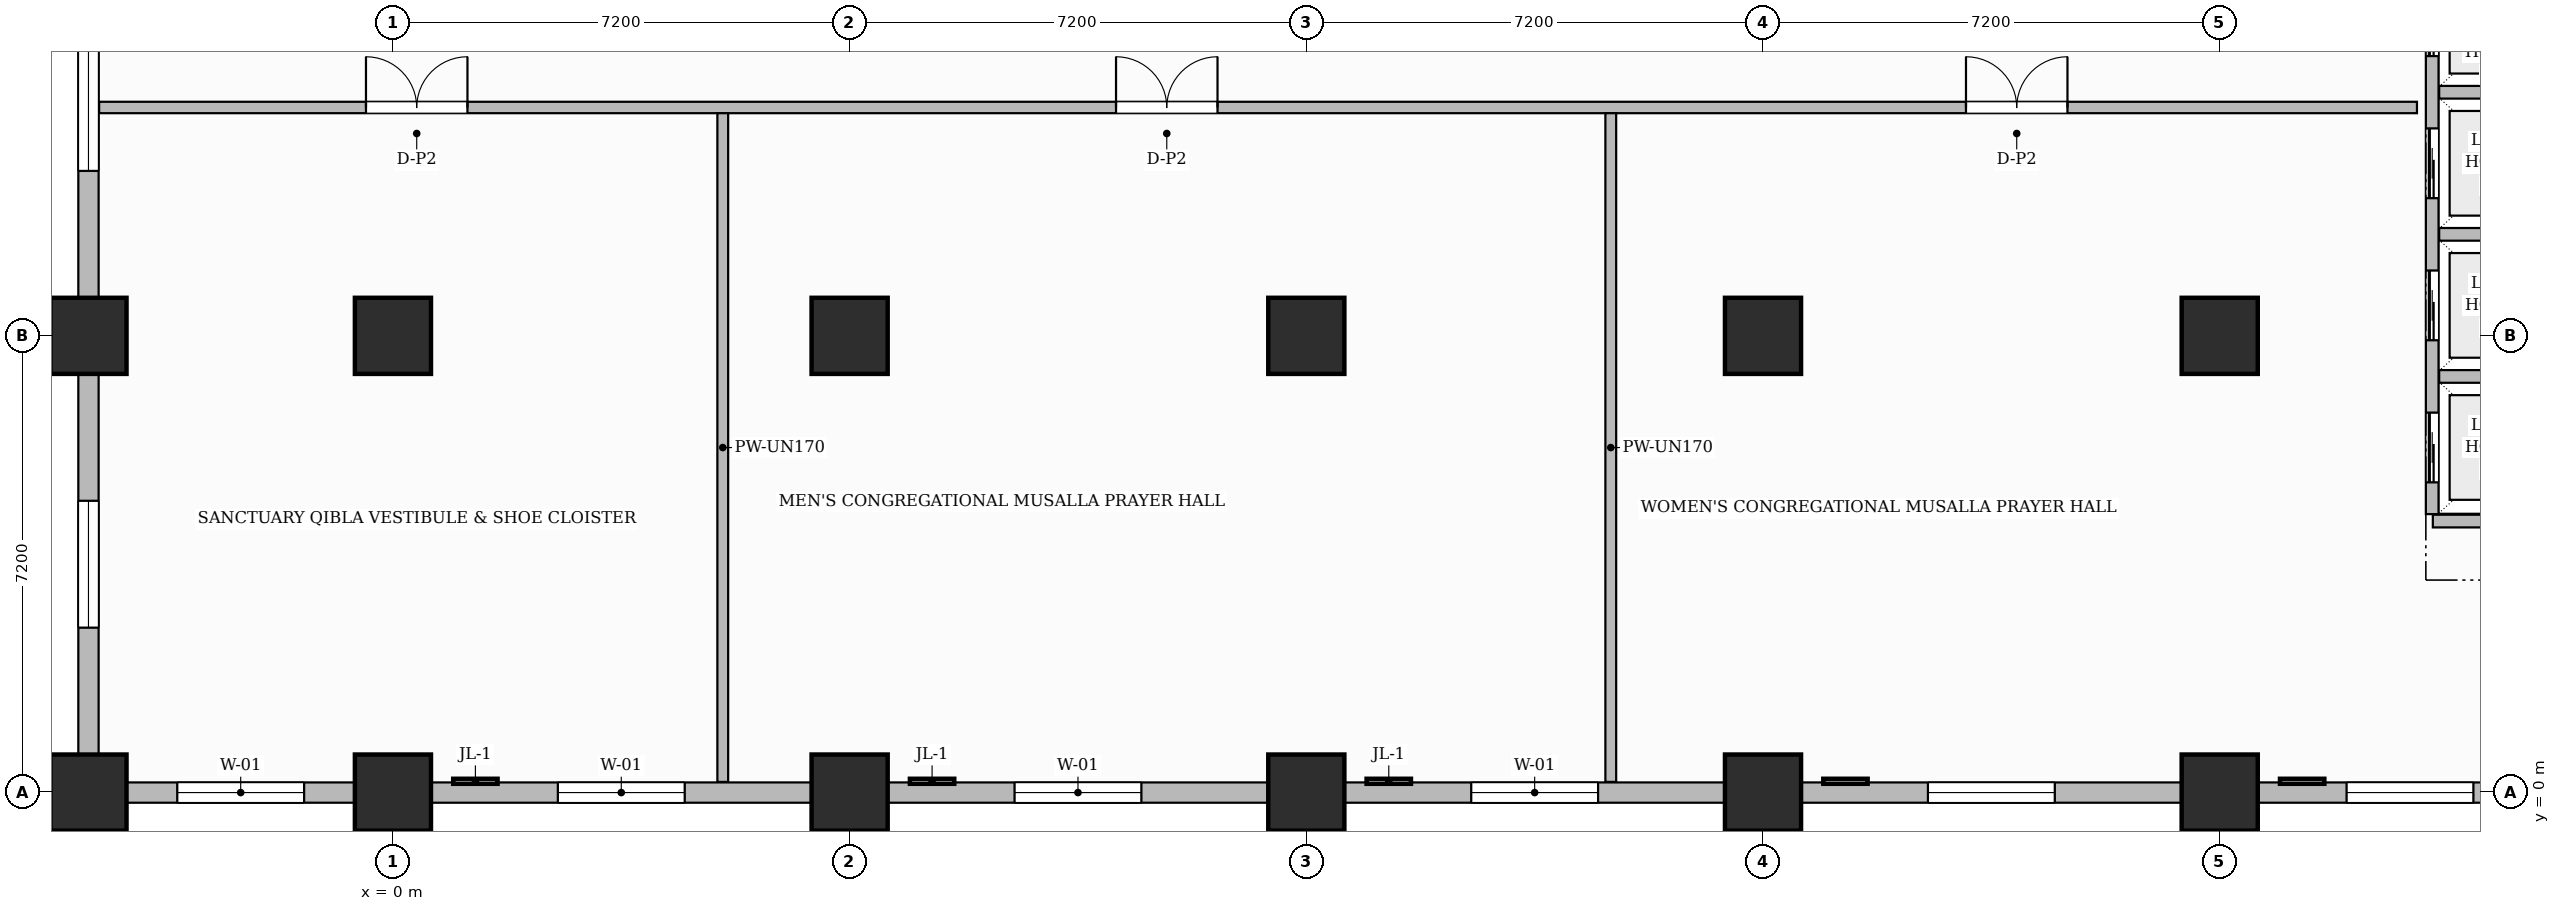
"""IFC4 building model, lengths in metres.
Left out: names, types, materials, properties, quantities, classifications, styles, units other than length and angle.
Written with IfcOpenShell. Run it as: python <this file> out.ifc"""

import sys

from ifc_helpers import new_model, si_unit, direction, frame, frame_2d, origin, origin_2d, place, context, subcontext, project, spatial, rectangle, extrude, source, transform, mapped, element, fill, save


model = new_model("IFC4")
c1 = context("Model", 3, precision=1e-05, world=origin(), true_north=direction((0.0, 1.0)))
c2 = subcontext(c1, "Body", "Model", "MODEL_VIEW")
j1 = project(units=[si_unit("LENGTHUNIT", "METRE"), si_unit("PLANEANGLEUNIT", "RADIAN")], contexts=[c1])
p1 = place(None, origin())
s1 = spatial("IfcSite", under=j1, at=p1, CompositionType="ELEMENT")
p2 = place(p1, origin())
s2 = spatial("IfcBuilding", under=s1, at=p2, CompositionType="ELEMENT")
p3 = place(p2, frame((0.0, 0.0, 21.6)))
s3 = spatial("IfcBuildingStorey", under=s2, at=p3, CompositionType="ELEMENT", Elevation=21.6)
m1 = source(origin(), c2, "Body", "SweptSolid", [
    extrude(rectangle(XDim=1.2, YDim=1.2, at=origin_2d()), origin(), (0.0, 0.0, 1.0), 5.4),
])
for number, where, z_axis, x_axis in (
    (1, (-4.8, 0.0, 0.0), (0.0, 0.0, 1.0), (1.0, 0.0, 0.0)),
    (2, (-4.8, 7.2, 0.0), (0.0, 0.0, 1.0), (1.0, 0.0, 0.0)),
    (3, (0.0, 0.0, 0.0), (0.0, 0.0, 1.0), (1.0, 0.0, 0.0)),
    (4, (0.0, 7.2, 0.0), (0.0, 0.0, 1.0), (1.0, 0.0, 0.0)),
    (5, (7.2, 0.0, 0.0), (0.0, 0.0, 1.0), (1.0, 0.0, 0.0)),
    (6, (7.2, 7.2, 0.0), (0.0, 0.0, 1.0), (1.0, 0.0, 0.0)),
    (7, (14.4, 0.0, 0.0), (0.0, 0.0, 1.0), (1.0, 0.0, 0.0)),
    (8, (14.4, 7.2, 0.0), (0.0, 0.0, 1.0), (1.0, 0.0, 0.0)),
    (9, (21.6, 0.0, 0.0), (0.0, 0.0, 1.0), (1.0, 0.0, 0.0)),
    (10, (21.6, 7.2, 0.0), (0.0, 0.0, 1.0), (1.0, 0.0, 0.0)),
    (11, (28.8, 0.0, 0.0), (0.0, 0.0, 1.0), (1.0, 0.0, 0.0)),
    (12, (28.8, 7.2, 0.0), (0.0, 0.0, 1.0), (1.0, 0.0, 0.0)),
):
    element("IfcColumn", number, at=place(p3, frame(where, z_axis=z_axis, x_axis=x_axis)), inside=s3, PredefinedType="COLUMN", context=c2, shape_type="MappedRepresentation", body=[
        mapped(m1, transform((0.0, 0.0, 0.0), scale=1.0)),
    ])
p4 = place(p3, frame((32.16, 4.28, 0.0), z_axis=(0.0, 0.0, 1.0), x_axis=(1.0, 0.0, 0.0)))
e13 = element("IfcWall", 13, at=p4, inside=s3, PredefinedType="PARTITIONING", context=c2, shape_type="SweptSolid", body=[
    extrude(rectangle(XDim=2.31, YDim=0.2, at=frame_2d((1.155, 0.0))), origin(), (0.0, 0.0, 1.0), 5.1),
])
p5 = place(p3, frame((32.15, 4.39, 0.0), z_axis=(0.0, 0.0, 1.0), x_axis=(0.0, 1.0, 0.0)))
e14 = element("IfcWall", 14, at=p5, inside=s3, PredefinedType="PARTITIONING", context=c2, shape_type="SweptSolid", body=[
    extrude(rectangle(XDim=8.82, YDim=0.2, at=frame_2d((4.41, 0.0))), origin(), (0.0, 0.0, 1.0), 5.1),
])
p6 = place(p5, frame((0.5, 0.0, 0.0)))
e15 = element("IfcOpeningElement", 15, at=p6, cuts=e14, PredefinedType="OPENING", context=c2, shape_type="SweptSolid", body=[
    extrude(rectangle(XDim=1.1, YDim=2.2, at=frame_2d((0.55, 1.1))), frame((0.0, 0.11, 0.0), z_axis=(0.0, -1.0, 0.0), x_axis=(1.0, 0.0, 0.0)), (0.0, 0.0, 1.0), 0.22),
])
p7 = place(p5, frame((2.74, 0.0, 0.0)))
e16 = element("IfcOpeningElement", 16, at=p7, cuts=e14, PredefinedType="OPENING", context=c2, shape_type="SweptSolid", body=[
    extrude(rectangle(XDim=1.1, YDim=2.2, at=frame_2d((0.55, 1.1))), frame((0.0, 0.11, 0.0), z_axis=(0.0, -1.0, 0.0), x_axis=(1.0, 0.0, 0.0)), (0.0, 0.0, 1.0), 0.22),
])
p8 = place(p5, frame((4.98, 0.0, 0.0)))
e17 = element("IfcOpeningElement", 17, at=p8, cuts=e14, PredefinedType="OPENING", context=c2, shape_type="SweptSolid", body=[
    extrude(rectangle(XDim=1.1, YDim=2.2, at=frame_2d((0.55, 1.1))), frame((0.0, 0.11, 0.0), z_axis=(0.0, -1.0, 0.0), x_axis=(1.0, 0.0, 0.0)), (0.0, 0.0, 1.0), 0.22),
])
p9 = place(p5, frame((7.22, 0.0, 0.0)))
e18 = element("IfcOpeningElement", 18, at=p9, cuts=e14, PredefinedType="OPENING", context=c2, shape_type="SweptSolid", body=[
    extrude(rectangle(XDim=1.1, YDim=2.2, at=frame_2d((0.55, 1.1))), frame((0.0, 0.11, 0.0), z_axis=(0.0, -1.0, 0.0), x_axis=(1.0, 0.0, 0.0)), (0.0, 0.0, 1.0), 0.22),
])
for number, where, z_axis, x_axis in (
    (19, (32.26, 6.56, 0.0), (0.0, 0.0, 1.0), (1.0, 0.0, 0.0)),
    (20, (32.26, 8.8, 0.0), (0.0, 0.0, 1.0), (1.0, 0.0, 0.0)),
    (21, (32.26, 11.04, 0.0), (0.0, 0.0, 1.0), (1.0, 0.0, 0.0)),
):
    element("IfcWall", number, at=place(p3, frame(where, z_axis=z_axis, x_axis=x_axis)), inside=s3, PredefinedType="PARTITIONING", context=c2, shape_type="SweptSolid", body=[
        extrude(rectangle(XDim=2.18, YDim=0.2, at=frame_2d((1.09, 0.0))), origin(), (0.0, 0.0, 1.0), 5.1),
    ])
p10 = place(p3, frame((-4.632, 10.8, 0.0), z_axis=(0.0, 0.0, 1.0), x_axis=(1.0, 0.0, 0.0)))
e22 = element("IfcWall", 22, at=p10, inside=s3, PredefinedType="PARTITIONING", context=c2, shape_type="SweptSolid", body=[
    extrude(rectangle(XDim=36.542, YDim=0.18, at=frame_2d((18.271, 0.0))), origin(), (0.0, 0.0, 1.0), 5.1),
])
p11 = place(p10, frame((4.207, 0.0, 0.0)))
e23 = element("IfcOpeningElement", 23, at=p11, cuts=e22, PredefinedType="OPENING", context=c2, shape_type="SweptSolid", body=[
    extrude(rectangle(XDim=1.6, YDim=2.4, at=frame_2d((0.8, 1.2))), frame((0.0, 0.1, 0.0), z_axis=(0.0, -1.0, 0.0), x_axis=(1.0, 0.0, 0.0)), (0.0, 0.0, 1.0), 0.2),
])
p12 = place(p10, frame((16.032, 0.0, 0.0)))
e24 = element("IfcOpeningElement", 24, at=p12, cuts=e22, PredefinedType="OPENING", context=c2, shape_type="SweptSolid", body=[
    extrude(rectangle(XDim=1.6, YDim=2.4, at=frame_2d((0.8, 1.2))), frame((0.0, 0.1, 0.0), z_axis=(0.0, -1.0, 0.0), x_axis=(1.0, 0.0, 0.0)), (0.0, 0.0, 1.0), 0.2),
])
p13 = place(p10, frame((29.432, 0.0, 0.0)))
e25 = element("IfcOpeningElement", 25, at=p13, cuts=e22, PredefinedType="OPENING", context=c2, shape_type="SweptSolid", body=[
    extrude(rectangle(XDim=1.6, YDim=2.4, at=frame_2d((0.8, 1.2))), frame((0.0, 0.1, 0.0), z_axis=(0.0, -1.0, 0.0), x_axis=(1.0, 0.0, 0.0)), (0.0, 0.0, 1.0), 0.2),
])
for number, where, z_axis, x_axis in (
    (26, (5.2, 0.168, 0.0), (0.0, 0.0, 1.0), (0.0, 1.0, 0.0)),
    (27, (19.2, 0.168, 0.0), (0.0, 0.0, 1.0), (0.0, 1.0, 0.0)),
):
    element("IfcWall", number, at=place(p3, frame(where, z_axis=z_axis, x_axis=x_axis)), inside=s3, PredefinedType="PARTITIONING", context=c2, shape_type="SweptSolid", body=[
        extrude(rectangle(XDim=10.542, YDim=0.17, at=frame_2d((5.271, 0.0))), origin(), (0.0, 0.0, 1.0), 5.1),
    ])
p14 = place(p3, frame((-4.8, 0.0, 0.0), z_axis=(0.0, 0.0, 1.0), x_axis=(1.0, 0.0, 0.0)))
e28 = element("IfcWall", 28, at=p14, inside=s3, PredefinedType="SOLIDWALL", context=c2, shape_type="SweptSolid", body=[
    extrude(rectangle(XDim=85.2, YDim=0.32, at=frame_2d((42.6, 0.0))), origin(), (0.0, 0.0, 1.0), 4.085),
])
p15 = place(p14, frame((1.4, 0.0, 0.75)))
e29 = element("IfcOpeningElement", 29, at=p15, cuts=e28, PredefinedType="OPENING", context=c2, shape_type="SweptSolid", body=[
    extrude(rectangle(XDim=2.0, YDim=2.6, at=frame_2d((1.0, 1.3))), frame((0.0, 0.17, 0.0), z_axis=(0.0, -1.0, 0.0), x_axis=(1.0, 0.0, 0.0)), (0.0, 0.0, 1.0), 0.34),
])
p16 = place(p14, frame((7.4, 0.0, 0.75)))
e30 = element("IfcOpeningElement", 30, at=p16, cuts=e28, PredefinedType="OPENING", context=c2, shape_type="SweptSolid", body=[
    extrude(rectangle(XDim=2.0, YDim=2.6, at=frame_2d((1.0, 1.3))), frame((0.0, 0.17, 0.0), z_axis=(0.0, -1.0, 0.0), x_axis=(1.0, 0.0, 0.0)), (0.0, 0.0, 1.0), 0.34),
])
p17 = place(p14, frame((14.6, 0.0, 0.75)))
e31 = element("IfcOpeningElement", 31, at=p17, cuts=e28, PredefinedType="OPENING", context=c2, shape_type="SweptSolid", body=[
    extrude(rectangle(XDim=2.0, YDim=2.6, at=frame_2d((1.0, 1.3))), frame((0.0, 0.17, 0.0), z_axis=(0.0, -1.0, 0.0), x_axis=(1.0, 0.0, 0.0)), (0.0, 0.0, 1.0), 0.34),
])
p18 = place(p14, frame((21.8, 0.0, 0.75)))
e32 = element("IfcOpeningElement", 32, at=p18, cuts=e28, PredefinedType="OPENING", context=c2, shape_type="SweptSolid", body=[
    extrude(rectangle(XDim=2.0, YDim=2.6, at=frame_2d((1.0, 1.3))), frame((0.0, 0.17, 0.0), z_axis=(0.0, -1.0, 0.0), x_axis=(1.0, 0.0, 0.0)), (0.0, 0.0, 1.0), 0.34),
])
p19 = place(p14, frame((29.0, 0.0, 0.75)))
e33 = element("IfcOpeningElement", 33, at=p19, cuts=e28, PredefinedType="OPENING", context=c2, shape_type="SweptSolid", body=[
    extrude(rectangle(XDim=2.0, YDim=2.6, at=frame_2d((1.0, 1.3))), frame((0.0, 0.17, 0.0), z_axis=(0.0, -1.0, 0.0), x_axis=(1.0, 0.0, 0.0)), (0.0, 0.0, 1.0), 0.34),
])
p20 = place(p14, frame((35.6, 0.0, 0.75)))
e34 = element("IfcOpeningElement", 34, at=p20, cuts=e28, PredefinedType="OPENING", context=c2, shape_type="SweptSolid", body=[
    extrude(rectangle(XDim=2.0, YDim=2.6, at=frame_2d((1.0, 1.3))), frame((0.0, 0.17, 0.0), z_axis=(0.0, -1.0, 0.0), x_axis=(1.0, 0.0, 0.0)), (0.0, 0.0, 1.0), 0.34),
])
p21 = place(p14, frame((42.2, 0.0, 0.75)))
e35 = element("IfcOpeningElement", 35, at=p21, cuts=e28, PredefinedType="OPENING", context=c2, shape_type="SweptSolid", body=[
    extrude(rectangle(XDim=2.0, YDim=2.6, at=frame_2d((1.0, 1.3))), frame((0.0, 0.17, 0.0), z_axis=(0.0, -1.0, 0.0), x_axis=(1.0, 0.0, 0.0)), (0.0, 0.0, 1.0), 0.34),
])
p22 = place(p14, frame((49.7, 0.0, 0.75)))
e36 = element("IfcOpeningElement", 36, at=p22, cuts=e28, PredefinedType="OPENING", context=c2, shape_type="SweptSolid", body=[
    extrude(rectangle(XDim=2.0, YDim=2.6, at=frame_2d((1.0, 1.3))), frame((0.0, 0.17, 0.0), z_axis=(0.0, -1.0, 0.0), x_axis=(1.0, 0.0, 0.0)), (0.0, 0.0, 1.0), 0.34),
])
p23 = place(p14, frame((57.5, 0.0, 0.75)))
e37 = element("IfcOpeningElement", 37, at=p23, cuts=e28, PredefinedType="OPENING", context=c2, shape_type="SweptSolid", body=[
    extrude(rectangle(XDim=2.0, YDim=2.6, at=frame_2d((1.0, 1.3))), frame((0.0, 0.17, 0.0), z_axis=(0.0, -1.0, 0.0), x_axis=(1.0, 0.0, 0.0)), (0.0, 0.0, 1.0), 0.34),
])
p24 = place(p14, frame((66.8, 0.0, 0.75)))
e38 = element("IfcOpeningElement", 38, at=p24, cuts=e28, PredefinedType="OPENING", context=c2, shape_type="SweptSolid", body=[
    extrude(rectangle(XDim=2.0, YDim=2.6, at=frame_2d((1.0, 1.3))), frame((0.0, 0.17, 0.0), z_axis=(0.0, -1.0, 0.0), x_axis=(1.0, 0.0, 0.0)), (0.0, 0.0, 1.0), 0.34),
])
p25 = place(p14, frame((77.6, 0.0, 0.75)))
e39 = element("IfcOpeningElement", 39, at=p25, cuts=e28, PredefinedType="OPENING", context=c2, shape_type="SweptSolid", body=[
    extrude(rectangle(XDim=2.0, YDim=2.6, at=frame_2d((1.0, 1.3))), frame((0.0, 0.17, 0.0), z_axis=(0.0, -1.0, 0.0), x_axis=(1.0, 0.0, 0.0)), (0.0, 0.0, 1.0), 0.34),
])
p26 = place(p3, frame((-4.8, 0.05, 0.0), z_axis=(0.0, 0.0, 1.0), x_axis=(0.0, 1.0, 0.0)))
e40 = element("IfcWall", 40, at=p26, inside=s3, PredefinedType="SOLIDWALL", context=c2, shape_type="SweptSolid", body=[
    extrude(rectangle(XDim=46.7, YDim=0.32, at=frame_2d((23.35, 0.0))), origin(), (0.0, 0.0, 1.0), 5.1),
])
p27 = place(p26, frame((2.55, 0.0, 0.75)))
e41 = element("IfcOpeningElement", 41, at=p27, cuts=e40, PredefinedType="OPENING", context=c2, shape_type="SweptSolid", body=[
    extrude(rectangle(XDim=2.0, YDim=2.6, at=frame_2d((1.0, 1.3))), frame((0.0, 0.17, 0.0), z_axis=(0.0, -1.0, 0.0), x_axis=(1.0, 0.0, 0.0)), (0.0, 0.0, 1.0), 0.34),
])
p28 = place(p26, frame((9.75, 0.0, 0.75)))
e42 = element("IfcOpeningElement", 42, at=p28, cuts=e40, PredefinedType="OPENING", context=c2, shape_type="SweptSolid", body=[
    extrude(rectangle(XDim=2.0, YDim=2.6, at=frame_2d((1.0, 1.3))), frame((0.0, 0.17, 0.0), z_axis=(0.0, -1.0, 0.0), x_axis=(1.0, 0.0, 0.0)), (0.0, 0.0, 1.0), 0.34),
])
p29 = place(p26, frame((16.95, 0.0, 0.75)))
e43 = element("IfcOpeningElement", 43, at=p29, cuts=e40, PredefinedType="OPENING", context=c2, shape_type="SweptSolid", body=[
    extrude(rectangle(XDim=2.0, YDim=2.6, at=frame_2d((1.0, 1.3))), frame((0.0, 0.17, 0.0), z_axis=(0.0, -1.0, 0.0), x_axis=(1.0, 0.0, 0.0)), (0.0, 0.0, 1.0), 0.34),
])
p30 = place(p26, frame((27.75, 0.0, 0.75)))
e44 = element("IfcOpeningElement", 44, at=p30, cuts=e40, PredefinedType="OPENING", context=c2, shape_type="SweptSolid", body=[
    extrude(rectangle(XDim=2.0, YDim=2.6, at=frame_2d((1.0, 1.3))), frame((0.0, 0.17, 0.0), z_axis=(0.0, -1.0, 0.0), x_axis=(1.0, 0.0, 0.0)), (0.0, 0.0, 1.0), 0.34),
])
p31 = place(p26, frame((34.95, 0.0, 0.75)))
e45 = element("IfcOpeningElement", 45, at=p31, cuts=e40, PredefinedType="OPENING", context=c2, shape_type="SweptSolid", body=[
    extrude(rectangle(XDim=2.0, YDim=2.6, at=frame_2d((1.0, 1.3))), frame((0.0, 0.17, 0.0), z_axis=(0.0, -1.0, 0.0), x_axis=(1.0, 0.0, 0.0)), (0.0, 0.0, 1.0), 0.34),
])
p32 = place(p26, frame((42.15, 0.0, 0.75)))
e46 = element("IfcOpeningElement", 46, at=p32, cuts=e40, PredefinedType="OPENING", context=c2, shape_type="SweptSolid", body=[
    extrude(rectangle(XDim=2.0, YDim=2.6, at=frame_2d((1.0, 1.3))), frame((0.0, 0.17, 0.0), z_axis=(0.0, -1.0, 0.0), x_axis=(1.0, 0.0, 0.0)), (0.0, 0.0, 1.0), 0.34),
])
m2 = source(origin(), c2, "Body", "SweptSolid", [
    extrude(rectangle(XDim=1.6, YDim=2.4, at=frame_2d((0.8, 1.2))), frame((0.0, 0.025, 0.0), z_axis=(0.0, -1.0, 0.0), x_axis=(1.0, 0.0, 0.0)), (0.0, 0.0, 1.0), 0.05),
])
p33 = place(p11, origin())
e47 = element("IfcDoor", 47, at=p33, inside=s3, OperationType="DOUBLE_DOOR_SINGLE_SWING", PredefinedType="DOOR", context=c2, shape_type="MappedRepresentation", body=[
    mapped(m2, transform((0.0, 0.0, 0.0), scale=1.0)),
])
fill(e23, e47)
p34 = place(p12, origin())
e48 = element("IfcDoor", 48, at=p34, inside=s3, OperationType="DOUBLE_DOOR_SINGLE_SWING", PredefinedType="DOOR", context=c2, shape_type="MappedRepresentation", body=[
    mapped(m2, transform((0.0, 0.0, 0.0), scale=1.0)),
])
fill(e24, e48)
p35 = place(p13, origin())
e49 = element("IfcDoor", 49, at=p35, inside=s3, OperationType="DOUBLE_DOOR_SINGLE_SWING", PredefinedType="DOOR", context=c2, shape_type="MappedRepresentation", body=[
    mapped(m2, transform((0.0, 0.0, 0.0), scale=1.0)),
])
fill(e25, e49)
m3 = source(origin(), c2, "Body", "SweptSolid", [
    extrude(rectangle(XDim=1.1, YDim=2.2, at=frame_2d((0.55, 1.1))), frame((0.0, 0.025, 0.0), z_axis=(0.0, -1.0, 0.0), x_axis=(1.0, 0.0, 0.0)), (0.0, 0.0, 1.0), 0.05),
])
p36 = place(p6, origin())
e50 = element("IfcDoor", 50, at=p36, inside=s3, OperationType="SLIDING_TO_LEFT", PredefinedType="DOOR", context=c2, shape_type="MappedRepresentation", body=[
    mapped(m3, transform((0.0, 0.0, 0.0), scale=1.0)),
])
fill(e15, e50)
p37 = place(p7, origin())
e51 = element("IfcDoor", 51, at=p37, inside=s3, OperationType="SLIDING_TO_LEFT", PredefinedType="DOOR", context=c2, shape_type="MappedRepresentation", body=[
    mapped(m3, transform((0.0, 0.0, 0.0), scale=1.0)),
])
fill(e16, e51)
p38 = place(p8, origin())
e52 = element("IfcDoor", 52, at=p38, inside=s3, OperationType="SLIDING_TO_LEFT", PredefinedType="DOOR", context=c2, shape_type="MappedRepresentation", body=[
    mapped(m3, transform((0.0, 0.0, 0.0), scale=1.0)),
])
fill(e17, e52)
p39 = place(p9, origin())
e53 = element("IfcDoor", 53, at=p39, inside=s3, OperationType="SLIDING_TO_LEFT", PredefinedType="DOOR", context=c2, shape_type="MappedRepresentation", body=[
    mapped(m3, transform((0.0, 0.0, 0.0), scale=1.0)),
])
fill(e18, e53)
m4 = source(origin(), c2, "Body", "SweptSolid", [
    extrude(rectangle(XDim=2.0, YDim=2.6, at=frame_2d((1.0, 1.3))), frame((0.0, 0.03, 0.0), z_axis=(0.0, -1.0, 0.0), x_axis=(1.0, 0.0, 0.0)), (0.0, 0.0, 1.0), 0.06),
])
p40 = place(p15, origin())
e54 = element("IfcWindow", 54, at=p40, inside=s3, PartitioningType="DOUBLE_PANEL_VERTICAL", PredefinedType="WINDOW", context=c2, shape_type="MappedRepresentation", body=[
    mapped(m4, transform((0.0, 0.0, 0.0), scale=1.0)),
])
fill(e29, e54)
p41 = place(p16, origin())
e55 = element("IfcWindow", 55, at=p41, inside=s3, PartitioningType="DOUBLE_PANEL_VERTICAL", PredefinedType="WINDOW", context=c2, shape_type="MappedRepresentation", body=[
    mapped(m4, transform((0.0, 0.0, 0.0), scale=1.0)),
])
fill(e30, e55)
p42 = place(p17, origin())
e56 = element("IfcWindow", 56, at=p42, inside=s3, PartitioningType="DOUBLE_PANEL_VERTICAL", PredefinedType="WINDOW", context=c2, shape_type="MappedRepresentation", body=[
    mapped(m4, transform((0.0, 0.0, 0.0), scale=1.0)),
])
fill(e31, e56)
p43 = place(p18, origin())
e57 = element("IfcWindow", 57, at=p43, inside=s3, PartitioningType="DOUBLE_PANEL_VERTICAL", PredefinedType="WINDOW", context=c2, shape_type="MappedRepresentation", body=[
    mapped(m4, transform((0.0, 0.0, 0.0), scale=1.0)),
])
fill(e32, e57)
p44 = place(p19, origin())
e58 = element("IfcWindow", 58, at=p44, inside=s3, PartitioningType="DOUBLE_PANEL_VERTICAL", PredefinedType="WINDOW", context=c2, shape_type="MappedRepresentation", body=[
    mapped(m4, transform((0.0, 0.0, 0.0), scale=1.0)),
])
fill(e33, e58)
p45 = place(p20, origin())
e59 = element("IfcWindow", 59, at=p45, inside=s3, PartitioningType="DOUBLE_PANEL_VERTICAL", PredefinedType="WINDOW", context=c2, shape_type="MappedRepresentation", body=[
    mapped(m4, transform((0.0, 0.0, 0.0), scale=1.0)),
])
fill(e34, e59)
p46 = place(p27, origin())
e60 = element("IfcWindow", 60, at=p46, inside=s3, PartitioningType="DOUBLE_PANEL_VERTICAL", PredefinedType="WINDOW", context=c2, shape_type="MappedRepresentation", body=[
    mapped(m4, transform((0.0, 0.0, 0.0), scale=1.0)),
])
fill(e41, e60)
p47 = place(p28, origin())
e61 = element("IfcWindow", 61, at=p47, inside=s3, PartitioningType="DOUBLE_PANEL_VERTICAL", PredefinedType="WINDOW", context=c2, shape_type="MappedRepresentation", body=[
    mapped(m4, transform((0.0, 0.0, 0.0), scale=1.0)),
])
fill(e42, e61)
save(model, sys.argv[1])
